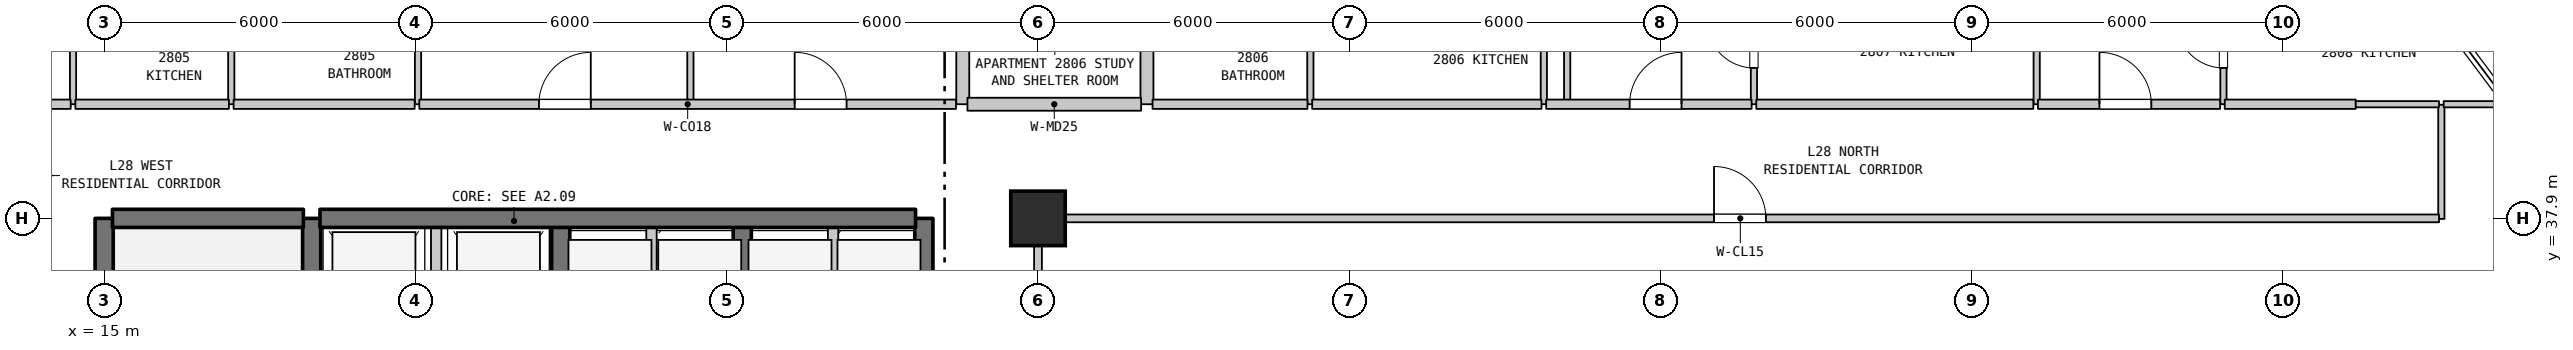
"""IFC4 building model, lengths in metres.
Left out: names, types, materials, properties, quantities, classifications, styles, units other than length and angle.
Written with IfcOpenShell. Run it as: python <this file> out.ifc"""

import sys

from ifc_helpers import new_model, si_unit, direction, frame, frame_2d, origin, origin_2d, place, context, subcontext, project, spatial, rectangle, extrude, element, fill, save


model = new_model("IFC4")
c1 = context("Model", 3, precision=1e-05, world=origin(), true_north=direction((0.0, 1.0)))
c2 = subcontext(c1, "Body", "Model", "MODEL_VIEW")
j1 = project(units=[si_unit("LENGTHUNIT", "METRE"), si_unit("PLANEANGLEUNIT", "RADIAN")], contexts=[c1])
p1 = place(None, origin())
s1 = spatial("IfcSite", under=j1, at=p1, CompositionType="ELEMENT")
p2 = place(p1, origin())
s2 = spatial("IfcBuilding", under=s1, at=p2, CompositionType="ELEMENT")
p3 = place(p2, frame((0.0, 0.0, 116.8)))
s3 = spatial("IfcBuildingStorey", under=s2, at=p3, CompositionType="ELEMENT", Elevation=116.8)
p4 = place(p3, frame((33.0, 37.9, 0.0), z_axis=(0.0, 0.0, 1.0), x_axis=(1.0, 0.0, 0.0)))
e1 = element("IfcColumn", 1, at=p4, inside=s3, PredefinedType="COLUMN", context=c2, shape_type="SweptSolid", body=[
    extrude(rectangle(XDim=1.05, YDim=1.05, at=origin_2d()), origin(), (0.0, 0.0, 1.0), 3.7),
])
p5 = place(p3, frame((14.4, 40.1, 0.0), z_axis=(0.0, 0.0, 1.0), x_axis=(0.0, 1.0, 0.0)))
e2 = element("IfcWall", 2, at=p5, inside=s3, PredefinedType="PARTITIONING", context=c2, shape_type="SweptSolid", body=[
    extrude(rectangle(XDim=2.3, YDim=0.12, at=frame_2d((1.15, 0.0))), origin(), (0.0, 0.0, 1.0), 3.38),
])
p6 = place(p3, frame((15.0, 31.1, 0.0), z_axis=(0.0, 0.0, 1.0), x_axis=(0.0, 1.0, 0.0)))
e3 = element("IfcWall", 3, at=p6, inside=s3, PredefinedType="SHEAR", context=c2, shape_type="SweptSolid", body=[
    extrude(rectangle(XDim=6.8, YDim=0.35, at=frame_2d((3.4, 0.0))), origin(), (0.0, 0.0, 1.0), 3.38),
])
p7 = place(p3, frame((17.45, 40.1, 0.0), z_axis=(0.0, 0.0, 1.0), x_axis=(0.0, 1.0, 0.0)))
e4 = element("IfcWall", 4, at=p7, inside=s3, PredefinedType="PARTITIONING", context=c2, shape_type="SweptSolid", body=[
    extrude(rectangle(XDim=2.3, YDim=0.12, at=frame_2d((1.15, 0.0))), origin(), (0.0, 0.0, 1.0), 3.38),
])
p8 = place(p3, frame((19.0, 35.0, 0.0), z_axis=(0.0, 0.0, 1.0), x_axis=(0.0, 1.0, 0.0)))
e5 = element("IfcWall", 5, at=p8, inside=s3, PredefinedType="SHEAR", context=c2, shape_type="SweptSolid", body=[
    extrude(rectangle(XDim=2.9, YDim=0.35, at=frame_2d((1.45, 0.0))), origin(), (0.0, 0.0, 1.0), 3.38),
])
p9 = place(p3, frame((21.05, 40.1, 0.0), z_axis=(0.0, 0.0, 1.0), x_axis=(0.0, 1.0, 0.0)))
e6 = element("IfcWall", 6, at=p9, inside=s3, PredefinedType="PARTITIONING", context=c2, shape_type="SweptSolid", body=[
    extrude(rectangle(XDim=2.3, YDim=0.12, at=frame_2d((1.15, 0.0))), origin(), (0.0, 0.0, 1.0), 3.08),
])
p10 = place(p3, frame((21.4, 35.0, 0.0), z_axis=(0.0, 0.0, 1.0), x_axis=(0.0, 1.0, 0.0)))
e7 = element("IfcWall", 7, at=p10, inside=s3, PredefinedType="STANDARD", context=c2, shape_type="SweptSolid", body=[
    extrude(rectangle(XDim=2.9, YDim=0.2, at=frame_2d((1.45, 0.0))), origin(), (0.0, 0.0, 1.0), 3.38),
])
p11 = place(p3, frame((23.8, 35.0, 0.0), z_axis=(0.0, 0.0, 1.0), x_axis=(0.0, 1.0, 0.0)))
e8 = element("IfcWall", 8, at=p11, inside=s3, PredefinedType="SHEAR", context=c2, shape_type="SweptSolid", body=[
    extrude(rectangle(XDim=2.9, YDim=0.35, at=frame_2d((1.45, 0.0))), origin(), (0.0, 0.0, 1.0), 3.38),
])
p12 = place(p3, frame((25.55, 35.0, 0.0), z_axis=(0.0, 0.0, 1.0), x_axis=(0.0, 1.0, 0.0)))
e9 = element("IfcWall", 9, at=p12, inside=s3, PredefinedType="STANDARD", context=c2, shape_type="SweptSolid", body=[
    extrude(rectangle(XDim=2.9, YDim=0.2, at=frame_2d((1.45, 0.0))), origin(), (0.0, 0.0, 1.0), 3.38),
])
p13 = place(p3, frame((26.3, 40.1, 0.0), z_axis=(0.0, 0.0, 1.0), x_axis=(0.0, 1.0, 0.0)))
e10 = element("IfcWall", 10, at=p13, inside=s3, PredefinedType="PARTITIONING", context=c2, shape_type="SweptSolid", body=[
    extrude(rectangle(XDim=2.05, YDim=0.12, at=frame_2d((1.025, 0.0))), origin(), (0.0, 0.0, 1.0), 3.38),
])
p14 = place(p3, frame((27.3, 35.0, 0.0), z_axis=(0.0, 0.0, 1.0), x_axis=(0.0, 1.0, 0.0)))
e11 = element("IfcWall", 11, at=p14, inside=s3, PredefinedType="SHEAR", context=c2, shape_type="SweptSolid", body=[
    extrude(rectangle(XDim=2.9, YDim=0.35, at=frame_2d((1.45, 0.0))), origin(), (0.0, 0.0, 1.0), 3.38),
])
p15 = place(p3, frame((29.05, 35.0, 0.0), z_axis=(0.0, 0.0, 1.0), x_axis=(0.0, 1.0, 0.0)))
e12 = element("IfcWall", 12, at=p15, inside=s3, PredefinedType="STANDARD", context=c2, shape_type="SweptSolid", body=[
    extrude(rectangle(XDim=2.9, YDim=0.2, at=frame_2d((1.45, 0.0))), origin(), (0.0, 0.0, 1.0), 3.38),
])
p16 = place(p3, frame((30.8, 35.0, 0.0), z_axis=(0.0, 0.0, 1.0), x_axis=(0.0, 1.0, 0.0)))
e13 = element("IfcWall", 13, at=p16, inside=s3, PredefinedType="SHEAR", context=c2, shape_type="SweptSolid", body=[
    extrude(rectangle(XDim=2.9, YDim=0.35, at=frame_2d((1.45, 0.0))), origin(), (0.0, 0.0, 1.0), 3.38),
])
p17 = place(p3, frame((31.55, 40.1, 0.0), z_axis=(0.0, 0.0, 1.0), x_axis=(0.0, 1.0, 0.0)))
e14 = element("IfcWall", 14, at=p17, inside=s3, PredefinedType="STANDARD", context=c2, shape_type="SweptSolid", body=[
    extrude(rectangle(XDim=2.3, YDim=0.25, at=frame_2d((1.15, 0.0))), origin(), (0.0, 0.0, 1.0), 3.38),
])
p18 = place(p3, frame((33.0, 27.91, 0.0), z_axis=(0.0, 0.0, 1.0), x_axis=(0.0, 1.0, 0.0)))
e15 = element("IfcWall", 15, at=p18, inside=s3, PredefinedType="STANDARD", context=c2, shape_type="SweptSolid", body=[
    extrude(rectangle(XDim=9.98, YDim=0.15, at=frame_2d((4.99, 0.0))), origin(), (0.0, 0.0, 1.0), 2.88),
])
p19 = place(p3, frame((35.1, 40.1, 0.0), z_axis=(0.0, 0.0, 1.0), x_axis=(0.0, 1.0, 0.0)))
e16 = element("IfcWall", 16, at=p19, inside=s3, PredefinedType="STANDARD", context=c2, shape_type="SweptSolid", body=[
    extrude(rectangle(XDim=2.3, YDim=0.25, at=frame_2d((1.15, 0.0))), origin(), (0.0, 0.0, 1.0), 3.38),
])
for number, where, z_axis, x_axis in (
    (17, (38.25, 40.1, 0.0), (0.0, 0.0, 1.0), (0.0, 1.0, 0.0)),
    (18, (42.75, 40.1, 0.0), (0.0, 0.0, 1.0), (0.0, 1.0, 0.0)),
):
    element("IfcWall", number, at=place(p3, frame(where, z_axis=z_axis, x_axis=x_axis)), inside=s3, PredefinedType="PARTITIONING", context=c2, shape_type="SweptSolid", body=[
        extrude(rectangle(XDim=2.3, YDim=0.12, at=frame_2d((1.15, 0.0))), origin(), (0.0, 0.0, 1.0), 3.38),
    ])
p20 = place(p3, frame((43.2, 40.1, 0.0), z_axis=(0.0, 0.0, 1.0), x_axis=(0.0, 1.0, 0.0)))
e19 = element("IfcWall", 19, at=p20, inside=s3, PredefinedType="PARTITIONING", context=c2, shape_type="SweptSolid", body=[
    extrude(rectangle(XDim=13.79, YDim=0.12, at=frame_2d((6.895, 0.0))), origin(), (0.0, 0.0, 1.0), 3.38),
])
p21 = place(p3, frame((46.8, 40.1, 0.0), z_axis=(0.0, 0.0, 1.0), x_axis=(0.0, 1.0, 0.0)))
e20 = element("IfcWall", 20, at=p21, inside=s3, PredefinedType="PARTITIONING", context=c2, shape_type="SweptSolid", body=[
    extrude(rectangle(XDim=2.3, YDim=0.12, at=frame_2d((1.15, 0.0))), origin(), (0.0, 0.0, 1.0), 3.38),
])
p22 = place(p21, frame((0.7, 0.0, 0.0)))
e21 = element("IfcOpeningElement", 21, at=p22, cuts=e20, PredefinedType="OPENING", context=c2, shape_type="SweptSolid", body=[
    extrude(rectangle(XDim=0.9, YDim=2.15, at=frame_2d((0.45, 1.075))), frame((0.0, 0.07, 0.0), z_axis=(0.0, -1.0, 0.0), x_axis=(1.0, 0.0, 0.0)), (0.0, 0.0, 1.0), 0.14),
])
p23 = place(p3, frame((52.25, 40.1, 0.0), z_axis=(0.0, 0.0, 1.0), x_axis=(0.0, 1.0, 0.0)))
e22 = element("IfcWall", 22, at=p23, inside=s3, PredefinedType="PARTITIONING", context=c2, shape_type="SweptSolid", body=[
    extrude(rectangle(XDim=2.3, YDim=0.12, at=frame_2d((1.15, 0.0))), origin(), (0.0, 0.0, 1.0), 3.38),
])
p24 = place(p3, frame((55.85, 40.1, 0.0), z_axis=(0.0, 0.0, 1.0), x_axis=(0.0, 1.0, 0.0)))
e23 = element("IfcWall", 23, at=p24, inside=s3, PredefinedType="PARTITIONING", context=c2, shape_type="SweptSolid", body=[
    extrude(rectangle(XDim=2.3, YDim=0.12, at=frame_2d((1.15, 0.0))), origin(), (0.0, 0.0, 1.0), 3.38),
])
p25 = place(p24, frame((0.7, 0.0, 0.0)))
e24 = element("IfcOpeningElement", 24, at=p25, cuts=e23, PredefinedType="OPENING", context=c2, shape_type="SweptSolid", body=[
    extrude(rectangle(XDim=0.9, YDim=2.15, at=frame_2d((0.45, 1.075))), frame((0.0, 0.07, 0.0), z_axis=(0.0, -1.0, 0.0), x_axis=(1.0, 0.0, 0.0)), (0.0, 0.0, 1.0), 0.14),
])
p26 = place(p3, frame((60.05, 37.89, 0.0), z_axis=(0.0, 0.0, 1.0), x_axis=(0.0, 1.0, 0.0)))
e25 = element("IfcWall", 25, at=p26, inside=s3, PredefinedType="PARTITIONING", context=c2, shape_type="SweptSolid", body=[
    extrude(rectangle(XDim=2.2, YDim=0.12, at=frame_2d((1.1, 0.0))), origin(), (0.0, 0.0, 1.0), 3.38),
])
p27 = place(p3, frame((15.16, 37.9, 0.0), z_axis=(0.0, 0.0, 1.0), x_axis=(1.0, 0.0, 0.0)))
e26 = element("IfcWall", 26, at=p27, inside=s3, PredefinedType="SHEAR", context=c2, shape_type="SweptSolid", body=[
    extrude(rectangle(XDim=3.68, YDim=0.35, at=frame_2d((1.84, 0.0))), origin(), (0.0, 0.0, 1.0), 3.38),
])
p28 = place(p3, frame((19.16, 37.9, 0.0), z_axis=(0.0, 0.0, 1.0), x_axis=(1.0, 0.0, 0.0)))
e27 = element("IfcWall", 27, at=p28, inside=s3, PredefinedType="SHEAR", context=c2, shape_type="SweptSolid", body=[
    extrude(rectangle(XDim=11.48, YDim=0.35, at=frame_2d((5.74, 0.0))), origin(), (0.0, 0.0, 1.0), 3.38),
])
p29 = place(p3, frame((33.07, 37.9, 0.0), z_axis=(0.0, 0.0, 1.0), x_axis=(1.0, 0.0, 0.0)))
e28 = element("IfcWall", 28, at=p29, inside=s3, PredefinedType="STANDARD", context=c2, shape_type="SweptSolid", body=[
    extrude(rectangle(XDim=26.935, YDim=0.15, at=frame_2d((13.467, 0.0))), origin(), (0.0, 0.0, 1.0), 3.38),
])
p30 = place(p29, frame((12.96, 0.0, 0.0)))
e29 = element("IfcOpeningElement", 29, at=p30, cuts=e28, PredefinedType="OPENING", context=c2, shape_type="SweptSolid", body=[
    extrude(rectangle(XDim=1.0, YDim=2.15, at=frame_2d((0.5, 1.075))), frame((0.0, 0.085, 0.0), z_axis=(0.0, -1.0, 0.0), x_axis=(1.0, 0.0, 0.0)), (0.0, 0.0, 1.0), 0.17),
])
p31 = place(p3, frame((12.875, 40.1, 0.0), z_axis=(0.0, 0.0, 1.0), x_axis=(1.0, 0.0, 0.0)))
e30 = element("IfcWall", 30, at=p31, inside=s3, PredefinedType="STANDARD", context=c2, shape_type="SweptSolid", body=[
    extrude(rectangle(XDim=1.48, YDim=0.18, at=frame_2d((0.74, 0.0))), origin(), (0.0, 0.0, 1.0), 3.38),
])
p32 = place(p3, frame((14.445, 40.1, 0.0), z_axis=(0.0, 0.0, 1.0), x_axis=(1.0, 0.0, 0.0)))
e31 = element("IfcWall", 31, at=p32, inside=s3, PredefinedType="STANDARD", context=c2, shape_type="SweptSolid", body=[
    extrude(rectangle(XDim=2.96, YDim=0.18, at=frame_2d((1.48, 0.0))), origin(), (0.0, 0.0, 1.0), 3.38),
])
p33 = place(p3, frame((17.495, 40.1, 0.0), z_axis=(0.0, 0.0, 1.0), x_axis=(1.0, 0.0, 0.0)))
e32 = element("IfcWall", 32, at=p33, inside=s3, PredefinedType="STANDARD", context=c2, shape_type="SweptSolid", body=[
    extrude(rectangle(XDim=3.49, YDim=0.18, at=frame_2d((1.745, 0.0))), origin(), (0.0, 0.0, 1.0), 3.38),
])
p34 = place(p3, frame((21.075, 40.1, 0.0), z_axis=(0.0, 0.0, 1.0), x_axis=(1.0, 0.0, 0.0)))
e33 = element("IfcWall", 33, at=p34, inside=s3, PredefinedType="STANDARD", context=c2, shape_type="SweptSolid", body=[
    extrude(rectangle(XDim=10.345, YDim=0.18, at=frame_2d((5.172, 0.0))), origin(), (0.0, 0.0, 1.0), 3.38),
])
p35 = place(p34, frame((2.305, 0.0, 0.0)))
e34 = element("IfcOpeningElement", 34, at=p35, cuts=e33, PredefinedType="OPENING", context=c2, shape_type="SweptSolid", body=[
    extrude(rectangle(XDim=1.0, YDim=2.15, at=frame_2d((0.5, 1.075))), frame((0.0, 0.1, 0.0), z_axis=(0.0, -1.0, 0.0), x_axis=(1.0, 0.0, 0.0)), (0.0, 0.0, 1.0), 0.2),
])
p36 = place(p34, frame((7.235, 0.0, 0.0)))
e35 = element("IfcOpeningElement", 35, at=p36, cuts=e33, PredefinedType="OPENING", context=c2, shape_type="SweptSolid", body=[
    extrude(rectangle(XDim=1.0, YDim=2.15, at=frame_2d((0.5, 1.075))), frame((0.0, 0.1, 0.0), z_axis=(0.0, -1.0, 0.0), x_axis=(1.0, 0.0, 0.0)), (0.0, 0.0, 1.0), 0.2),
])
p37 = place(p3, frame((31.64, 40.1, 0.0), z_axis=(0.0, 0.0, 1.0), x_axis=(1.0, 0.0, 0.0)))
e36 = element("IfcWall", 36, at=p37, inside=s3, PredefinedType="STANDARD", context=c2, shape_type="SweptSolid", body=[
    extrude(rectangle(XDim=3.348, YDim=0.25, at=frame_2d((1.674, 0.0))), origin(), (0.0, 0.0, 1.0), 3.38),
])
p38 = place(p3, frame((35.208, 40.1, 0.0), z_axis=(0.0, 0.0, 1.0), x_axis=(1.0, 0.0, 0.0)))
e37 = element("IfcWall", 37, at=p38, inside=s3, PredefinedType="STANDARD", context=c2, shape_type="SweptSolid", body=[
    extrude(rectangle(XDim=2.987, YDim=0.18, at=frame_2d((1.494, 0.0))), origin(), (0.0, 0.0, 1.0), 3.38),
])
p39 = place(p3, frame((38.285, 40.1, 0.0), z_axis=(0.0, 0.0, 1.0), x_axis=(1.0, 0.0, 0.0)))
e38 = element("IfcWall", 38, at=p39, inside=s3, PredefinedType="STANDARD", context=c2, shape_type="SweptSolid", body=[
    extrude(rectangle(XDim=4.42, YDim=0.18, at=frame_2d((2.21, 0.0))), origin(), (0.0, 0.0, 1.0), 3.38),
])
p40 = place(p3, frame((42.795, 40.1, 0.0), z_axis=(0.0, 0.0, 1.0), x_axis=(1.0, 0.0, 0.0)))
e39 = element("IfcWall", 39, at=p40, inside=s3, PredefinedType="STANDARD", context=c2, shape_type="SweptSolid", body=[
    extrude(rectangle(XDim=3.96, YDim=0.18, at=frame_2d((1.98, 0.0))), origin(), (0.0, 0.0, 1.0), 3.38),
])
p41 = place(p40, frame((1.609, 0.0, 0.0)))
e40 = element("IfcOpeningElement", 40, at=p41, cuts=e39, PredefinedType="OPENING", context=c2, shape_type="SweptSolid", body=[
    extrude(rectangle(XDim=1.0, YDim=2.15, at=frame_2d((0.5, 1.075))), frame((0.0, 0.1, 0.0), z_axis=(0.0, -1.0, 0.0), x_axis=(1.0, 0.0, 0.0)), (0.0, 0.0, 1.0), 0.2),
])
p42 = place(p3, frame((46.845, 40.1, 0.0), z_axis=(0.0, 0.0, 1.0), x_axis=(1.0, 0.0, 0.0)))
e41 = element("IfcWall", 41, at=p42, inside=s3, PredefinedType="STANDARD", context=c2, shape_type="SweptSolid", body=[
    extrude(rectangle(XDim=5.34, YDim=0.18, at=frame_2d((2.67, 0.0))), origin(), (0.0, 0.0, 1.0), 3.38),
])
p43 = place(p3, frame((52.275, 40.1, 0.0), z_axis=(0.0, 0.0, 1.0), x_axis=(1.0, 0.0, 0.0)))
e42 = element("IfcWall", 42, at=p43, inside=s3, PredefinedType="STANDARD", context=c2, shape_type="SweptSolid", body=[
    extrude(rectangle(XDim=3.51, YDim=0.18, at=frame_2d((1.755, 0.0))), origin(), (0.0, 0.0, 1.0), 3.38),
])
p44 = place(p43, frame((1.185, 0.0, 0.0)))
e43 = element("IfcOpeningElement", 43, at=p44, cuts=e42, PredefinedType="OPENING", context=c2, shape_type="SweptSolid", body=[
    extrude(rectangle(XDim=1.0, YDim=2.15, at=frame_2d((0.5, 1.075))), frame((0.0, 0.1, 0.0), z_axis=(0.0, -1.0, 0.0), x_axis=(1.0, 0.0, 0.0)), (0.0, 0.0, 1.0), 0.2),
])
p45 = place(p3, frame((55.875, 40.1, 0.0), z_axis=(0.0, 0.0, 1.0), x_axis=(1.0, 0.0, 0.0)))
e44 = element("IfcWall", 44, at=p45, inside=s3, PredefinedType="STANDARD", context=c2, shape_type="SweptSolid", body=[
    extrude(rectangle(XDim=2.525, YDim=0.18, at=frame_2d((1.262, 0.0))), origin(), (0.0, 0.0, 1.0), 3.38),
])
p46 = place(p3, frame((58.4, 40.1, 0.0), z_axis=(0.0, 0.0, 1.0), x_axis=(1.0, 0.0, 0.0)))
e45 = element("IfcWall", 45, at=p46, inside=s3, PredefinedType="PARTITIONING", context=c2, shape_type="SweptSolid", body=[
    extrude(rectangle(XDim=1.605, YDim=0.12, at=frame_2d((0.802, 0.0))), origin(), (0.0, 0.0, 1.0), 3.38),
])
p47 = place(p3, frame((60.095, 40.1, 0.0), z_axis=(0.0, 0.0, 1.0), x_axis=(1.0, 0.0, 0.0)))
e46 = element("IfcWall", 46, at=p47, inside=s3, PredefinedType="PARTITIONING", context=c2, shape_type="SweptSolid", body=[
    extrude(rectangle(XDim=1.245, YDim=0.12, at=frame_2d((0.623, 0.0))), origin(), (0.0, 0.0, 1.0), 3.38),
])
p48 = place(p22, origin())
e47 = element("IfcDoor", 47, at=p48, inside=s3, OperationType="SINGLE_SWING_RIGHT", PredefinedType="DOOR", context=c2, shape_type="SweptSolid", body=[
    extrude(rectangle(XDim=0.9, YDim=2.15, at=frame_2d((0.45, 1.075))), frame((0.0, 0.025, 0.0), z_axis=(0.0, -1.0, 0.0), x_axis=(1.0, 0.0, 0.0)), (0.0, 0.0, 1.0), 0.05),
])
fill(e21, e47)
p49 = place(p25, origin())
e48 = element("IfcDoor", 48, at=p49, inside=s3, OperationType="SINGLE_SWING_RIGHT", PredefinedType="DOOR", context=c2, shape_type="SweptSolid", body=[
    extrude(rectangle(XDim=0.9, YDim=2.15, at=frame_2d((0.45, 1.075))), frame((0.0, 0.025, 0.0), z_axis=(0.0, -1.0, 0.0), x_axis=(1.0, 0.0, 0.0)), (0.0, 0.0, 1.0), 0.05),
])
fill(e24, e48)
p50 = place(p30, origin())
e49 = element("IfcDoor", 49, at=p50, inside=s3, OperationType="SINGLE_SWING_LEFT", PredefinedType="DOOR", context=c2, shape_type="SweptSolid", body=[
    extrude(rectangle(XDim=1.0, YDim=2.15, at=frame_2d((0.5, 1.075))), frame((0.0, 0.025, 0.0), z_axis=(0.0, -1.0, 0.0), x_axis=(1.0, 0.0, 0.0)), (0.0, 0.0, 1.0), 0.05),
])
fill(e29, e49)
p51 = place(p35, origin())
e50 = element("IfcDoor", 50, at=p51, inside=s3, OperationType="SINGLE_SWING_RIGHT", PredefinedType="DOOR", context=c2, shape_type="SweptSolid", body=[
    extrude(rectangle(XDim=1.0, YDim=2.15, at=frame_2d((0.5, 1.075))), frame((0.0, 0.025, 0.0), z_axis=(0.0, -1.0, 0.0), x_axis=(1.0, 0.0, 0.0)), (0.0, 0.0, 1.0), 0.05),
])
fill(e34, e50)
p52 = place(p36, origin())
e51 = element("IfcDoor", 51, at=p52, inside=s3, OperationType="SINGLE_SWING_LEFT", PredefinedType="DOOR", context=c2, shape_type="SweptSolid", body=[
    extrude(rectangle(XDim=1.0, YDim=2.15, at=frame_2d((0.5, 1.075))), frame((0.0, 0.025, 0.0), z_axis=(0.0, -1.0, 0.0), x_axis=(1.0, 0.0, 0.0)), (0.0, 0.0, 1.0), 0.05),
])
fill(e35, e51)
p53 = place(p41, origin())
e52 = element("IfcDoor", 52, at=p53, inside=s3, OperationType="SINGLE_SWING_RIGHT", PredefinedType="DOOR", context=c2, shape_type="SweptSolid", body=[
    extrude(rectangle(XDim=1.0, YDim=2.15, at=frame_2d((0.5, 1.075))), frame((0.0, 0.025, 0.0), z_axis=(0.0, -1.0, 0.0), x_axis=(1.0, 0.0, 0.0)), (0.0, 0.0, 1.0), 0.05),
])
fill(e40, e52)
p54 = place(p44, origin())
e53 = element("IfcDoor", 53, at=p54, inside=s3, OperationType="SINGLE_SWING_LEFT", PredefinedType="DOOR", context=c2, shape_type="SweptSolid", body=[
    extrude(rectangle(XDim=1.0, YDim=2.15, at=frame_2d((0.5, 1.075))), frame((0.0, 0.025, 0.0), z_axis=(0.0, -1.0, 0.0), x_axis=(1.0, 0.0, 0.0)), (0.0, 0.0, 1.0), 0.05),
])
fill(e43, e53)
save(model, sys.argv[1])
